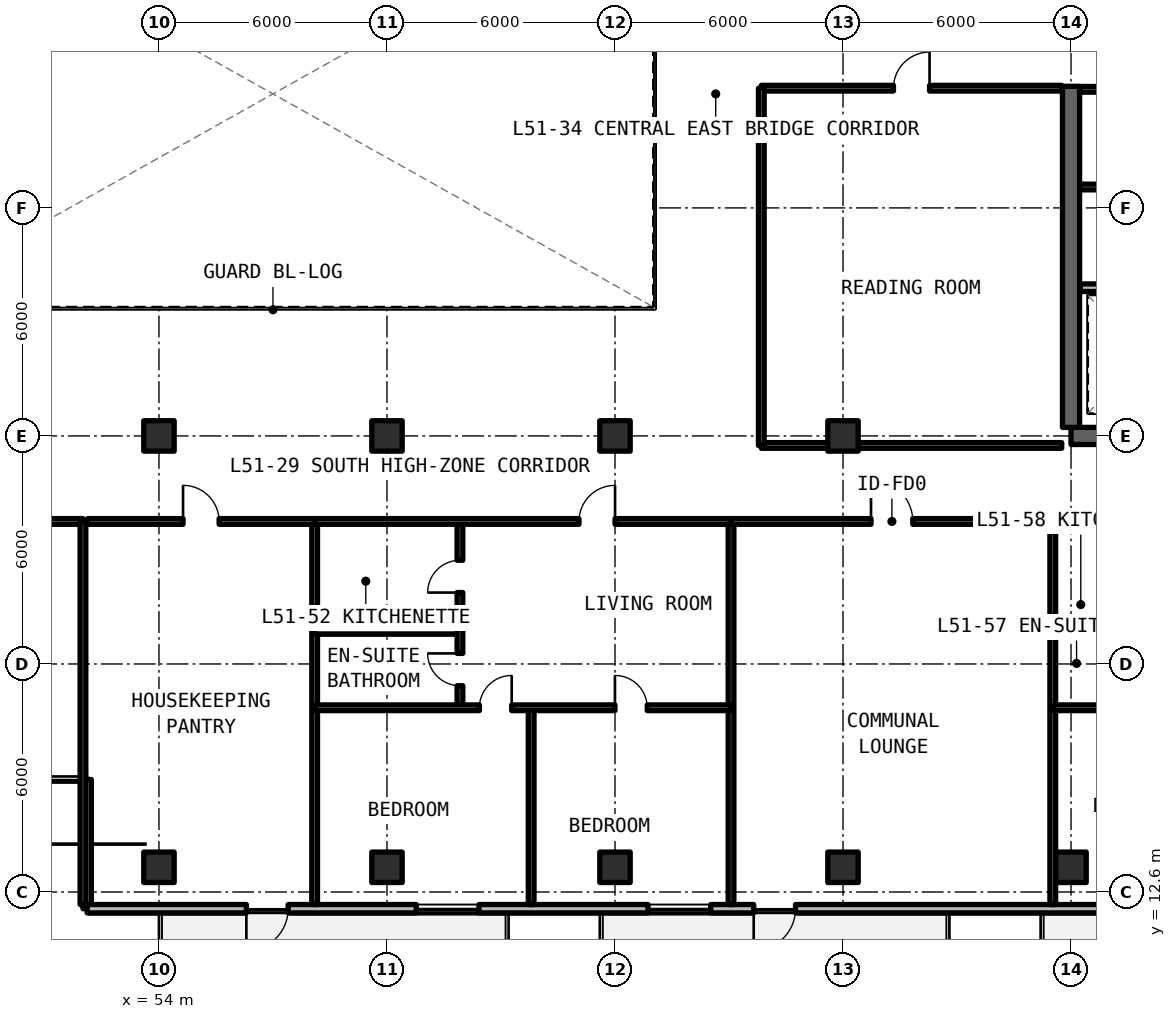
"""IFC4 building model, lengths in metres.
Left out: names, types, materials, properties, quantities, classifications, styles, units other than length and angle.
Written with IfcOpenShell. Run it as: python <this file> out.ifc"""

import sys

from ifc_helpers import new_model, si_unit, direction, frame, frame_2d, origin, origin_2d, place, context, subcontext, project, spatial, rectangle, extrude, element, fill, save


model = new_model("IFC4")
c1 = context("Model", 3, precision=1e-05, world=origin(), true_north=direction((0.0, 1.0)))
c2 = subcontext(c1, "Body", "Model", "MODEL_VIEW")
j1 = project(units=[si_unit("LENGTHUNIT", "METRE"), si_unit("PLANEANGLEUNIT", "RADIAN")], contexts=[c1])
p1 = place(None, origin())
s1 = spatial("IfcSite", under=j1, at=p1, CompositionType="ELEMENT")
p2 = place(p1, origin())
s2 = spatial("IfcBuilding", under=s1, at=p2, CompositionType="ELEMENT")
p3 = place(p2, frame((0.0, 0.0, 185.13)))
s3 = spatial("IfcBuildingStorey", under=s2, at=p3, CompositionType="ELEMENT", Elevation=185.13)
p4 = place(p3, frame((78.0, 24.6, 0.0), z_axis=(0.0, 0.0, 1.0), x_axis=(1.0, 0.0, 0.0)))
e1 = element("IfcWall", 1, at=p4, inside=s3, PredefinedType="SHEAR", context=c2, shape_type="SweptSolid", body=[
    extrude(rectangle(XDim=12.0, YDim=0.45, at=frame_2d((6.0, 0.0))), origin(), (0.0, 0.0, 1.0), 3.3),
])
p5 = place(p3, frame((78.0, 24.825, 0.0), z_axis=(0.0, 0.0, 1.0), x_axis=(0.0, 1.0, 0.0)))
e2 = element("IfcWall", 2, at=p5, inside=s3, PredefinedType="SHEAR", context=c2, shape_type="SweptSolid", body=[
    extrude(rectangle(XDim=8.975, YDim=0.45, at=frame_2d((4.488, 0.0))), origin(), (0.0, 0.0, 1.0), 3.3),
])
for number, where, z_axis, x_axis in (
    (3, (54.0, 24.6, 0.0), (0.0, 0.0, 1.0), (1.0, 0.0, 0.0)),
    (4, (60.0, 24.6, 0.0), (0.0, 0.0, 1.0), (1.0, 0.0, 0.0)),
    (5, (66.0, 24.6, 0.0), (0.0, 0.0, 1.0), (1.0, 0.0, 0.0)),
    (6, (72.0, 24.6, 0.0), (0.0, 0.0, 1.0), (1.0, 0.0, 0.0)),
    (7, (54.0, 13.25, 0.0), (0.0, 0.0, 1.0), (1.0, 0.0, 0.0)),
    (8, (60.0, 13.25, 0.0), (0.0, 0.0, 1.0), (1.0, 0.0, 0.0)),
    (9, (66.0, 13.25, 0.0), (0.0, 0.0, 1.0), (1.0, 0.0, 0.0)),
    (10, (72.0, 13.25, 0.0), (0.0, 0.0, 1.0), (1.0, 0.0, 0.0)),
    (11, (78.0, 13.25, 0.0), (0.0, 0.0, 1.0), (1.0, 0.0, 0.0)),
):
    element("IfcColumn", number, at=place(p3, frame(where, z_axis=z_axis, x_axis=x_axis)), inside=s3, PredefinedType="COLUMN", context=c2, shape_type="SweptSolid", body=[
        extrude(rectangle(XDim=0.8, YDim=0.8, at=origin_2d()), origin(), (0.0, 0.0, 1.0), 3.3),
    ])
p6 = place(p3, frame((52.11, 15.56, 0.0), z_axis=(0.0, 0.0, 1.0), x_axis=(0.0, -1.0, 0.0)))
e12 = element("IfcWall", 12, at=p6, inside=s3, PredefinedType="SOLIDWALL", context=c2, shape_type="SweptSolid", body=[
    extrude(rectangle(XDim=3.4, YDim=0.22, at=frame_2d((1.7, 0.0))), origin(), (0.0, 0.0, 1.0), 3.08),
])
p7 = place(p3, frame((52.11, 12.16, 0.0), z_axis=(0.0, 0.0, 1.0), x_axis=(1.0, 0.0, 0.0)))
e13 = element("IfcWall", 13, at=p7, inside=s3, PredefinedType="SOLIDWALL", context=c2, shape_type="SweptSolid", body=[
    extrude(rectangle(XDim=43.244, YDim=0.22, at=frame_2d((21.622, 0.0))), origin(), (0.0, 0.0, 1.0), 3.08),
])
p8 = place(p7, frame((4.19, 0.0, 0.0)))
e14 = element("IfcOpeningElement", 14, at=p8, cuts=e13, PredefinedType="OPENING", context=c2, shape_type="SweptSolid", body=[
    extrude(rectangle(XDim=1.1, YDim=2.15, at=frame_2d((0.55, 1.075))), frame((0.0, 0.12, 0.0), z_axis=(0.0, -1.0, 0.0), x_axis=(1.0, 0.0, 0.0)), (0.0, 0.0, 1.0), 0.24),
])
p9 = place(p7, frame((17.54, 0.0, 0.0)))
e15 = element("IfcOpeningElement", 15, at=p9, cuts=e13, PredefinedType="OPENING", context=c2, shape_type="SweptSolid", body=[
    extrude(rectangle(XDim=1.1, YDim=2.15, at=frame_2d((0.55, 1.075))), frame((0.0, 0.12, 0.0), z_axis=(0.0, -1.0, 0.0), x_axis=(1.0, 0.0, 0.0)), (0.0, 0.0, 1.0), 0.24),
])
p10 = place(p7, frame((28.89, 0.0, 0.0)))
e16 = element("IfcOpeningElement", 16, at=p10, cuts=e13, PredefinedType="OPENING", context=c2, shape_type="SweptSolid", body=[
    extrude(rectangle(XDim=1.1, YDim=2.15, at=frame_2d((0.55, 1.075))), frame((0.0, 0.12, 0.0), z_axis=(0.0, -1.0, 0.0), x_axis=(1.0, 0.0, 0.0)), (0.0, 0.0, 1.0), 0.24),
])
p11 = place(p7, frame((8.66, 0.0, 0.78)))
e17 = element("IfcOpeningElement", 17, at=p11, cuts=e13, PredefinedType="OPENING", context=c2, shape_type="SweptSolid", body=[
    extrude(rectangle(XDim=1.65, YDim=1.66, at=frame_2d((0.825, 0.83))), frame((0.0, 0.12, 0.0), z_axis=(0.0, -1.0, 0.0), x_axis=(1.0, 0.0, 0.0)), (0.0, 0.0, 1.0), 0.24),
])
p12 = place(p7, frame((14.759, 0.0, 0.78)))
e18 = element("IfcOpeningElement", 18, at=p12, cuts=e13, PredefinedType="OPENING", context=c2, shape_type="SweptSolid", body=[
    extrude(rectangle(XDim=1.65, YDim=1.66, at=frame_2d((0.825, 0.83))), frame((0.0, 0.12, 0.0), z_axis=(0.0, -1.0, 0.0), x_axis=(1.0, 0.0, 0.0)), (0.0, 0.0, 1.0), 0.24),
])
p13 = place(p7, frame((32.902, 0.0, 0.78)))
e19 = element("IfcOpeningElement", 19, at=p13, cuts=e13, PredefinedType="OPENING", context=c2, shape_type="SweptSolid", body=[
    extrude(rectangle(XDim=1.65, YDim=1.66, at=frame_2d((0.825, 0.83))), frame((0.0, 0.12, 0.0), z_axis=(0.0, -1.0, 0.0), x_axis=(1.0, 0.0, 0.0)), (0.0, 0.0, 1.0), 0.24),
])
p14 = place(p7, frame((38.313, 0.0, 0.78)))
e20 = element("IfcOpeningElement", 20, at=p14, cuts=e13, PredefinedType="OPENING", context=c2, shape_type="SweptSolid", body=[
    extrude(rectangle(XDim=0.85, YDim=1.65, at=frame_2d((0.425, 0.825))), frame((0.0, 0.12, 0.0), z_axis=(0.0, -1.0, 0.0), x_axis=(1.0, 0.0, 0.0)), (0.0, 0.0, 1.0), 0.24),
])
p15 = place(p7, frame((40.615, 0.0, 0.78)))
e21 = element("IfcOpeningElement", 21, at=p15, cuts=e13, PredefinedType="OPENING", context=c2, shape_type="SweptSolid", body=[
    extrude(rectangle(XDim=1.65, YDim=1.66, at=frame_2d((0.825, 0.83))), frame((0.0, 0.12, 0.0), z_axis=(0.0, -1.0, 0.0), x_axis=(1.0, 0.0, 0.0)), (0.0, 0.0, 1.0), 0.24),
])
p16 = place(p3, frame((78.245, 28.5, 0.0), z_axis=(0.0, 0.0, 1.0), x_axis=(1.0, 0.0, 0.0)))
e22 = element("IfcWall", 22, at=p16, inside=s3, PredefinedType="SOLIDWALL", context=c2, shape_type="SweptSolid", body=[
    extrude(rectangle(XDim=7.585, YDim=0.2, at=frame_2d((3.792, 0.0))), origin(), (0.0, 0.0, 1.0), 2.35),
])
p17 = place(p16, frame((3.555, 0.0, 0.0)))
e23 = element("IfcOpeningElement", 23, at=p17, cuts=e22, PredefinedType="OPENING", context=c2, shape_type="SweptSolid", body=[
    extrude(rectangle(XDim=1.0, YDim=2.15, at=frame_2d((0.5, 1.075))), frame((0.0, 0.11, 0.0), z_axis=(0.0, -1.0, 0.0), x_axis=(1.0, 0.0, 0.0)), (0.0, 0.0, 1.0), 0.22),
])
for number, where, z_axis, x_axis in (
    (24, (78.245, 31.15, 0.0), (0.0, 0.0, 1.0), (1.0, 0.0, 0.0)),
    (25, (78.245, 33.72, 0.0), (0.0, 0.0, 1.0), (1.0, 0.0, 0.0)),
):
    element("IfcWall", number, at=place(p3, frame(where, z_axis=z_axis, x_axis=x_axis)), inside=s3, PredefinedType="SOLIDWALL", context=c2, shape_type="SweptSolid", body=[
        extrude(rectangle(XDim=3.075, YDim=0.15, at=frame_2d((1.538, 0.0))), origin(), (0.0, 0.0, 1.0), 2.35),
    ])
p18 = place(p3, frame((69.85, 24.35, 0.0), z_axis=(0.0, 0.0, 1.0), x_axis=(1.0, 0.0, 0.0)))
e26 = element("IfcWall", 26, at=p18, inside=s3, PredefinedType="SOLIDWALL", context=c2, shape_type="SweptSolid", body=[
    extrude(rectangle(XDim=7.905, YDim=0.15, at=frame_2d((3.952, 0.0))), origin(), (0.0, 0.0, 1.0), 2.35),
])
p19 = place(p3, frame((69.85, 33.75, 0.0), z_axis=(0.0, 0.0, 1.0), x_axis=(1.0, 0.0, 0.0)))
e27 = element("IfcWall", 27, at=p19, inside=s3, PredefinedType="SOLIDWALL", context=c2, shape_type="SweptSolid", body=[
    extrude(rectangle(XDim=7.905, YDim=0.15, at=frame_2d((3.952, 0.0))), origin(), (0.0, 0.0, 1.0), 2.35),
])
p20 = place(p19, frame((3.478, 0.0, 0.0)))
e28 = element("IfcOpeningElement", 28, at=p20, cuts=e27, PredefinedType="OPENING", context=c2, shape_type="SweptSolid", body=[
    extrude(rectangle(XDim=0.95, YDim=2.15, at=frame_2d((0.475, 1.075))), frame((0.0, 0.085, 0.0), z_axis=(0.0, -1.0, 0.0), x_axis=(1.0, 0.0, 0.0)), (0.0, 0.0, 1.0), 0.17),
])
p21 = place(p3, frame((69.85, 24.35, 0.0), z_axis=(0.0, 0.0, 1.0), x_axis=(0.0, 1.0, 0.0)))
e29 = element("IfcWall", 29, at=p21, inside=s3, PredefinedType="SOLIDWALL", context=c2, shape_type="SweptSolid", body=[
    extrude(rectangle(XDim=9.4, YDim=0.15, at=frame_2d((4.7, 0.0))), origin(), (0.0, 0.0, 1.0), 2.35),
])
p22 = place(p3, frame((43.6, 22.35, 0.0), z_axis=(0.0, 0.0, 1.0), x_axis=(1.0, 0.0, 0.0)))
e30 = element("IfcWall", 30, at=p22, inside=s3, PredefinedType="SOLIDWALL", context=c2, shape_type="SweptSolid", body=[
    extrude(rectangle(XDim=8.4, YDim=0.15, at=frame_2d((4.2, 0.0))), origin(), (0.0, 0.0, 1.0), 2.35),
])
p23 = place(p22, frame((3.65, 0.0, 0.0)))
e31 = element("IfcOpeningElement", 31, at=p23, cuts=e30, PredefinedType="OPENING", context=c2, shape_type="SweptSolid", body=[
    extrude(rectangle(XDim=1.1, YDim=2.15, at=frame_2d((0.55, 1.075))), frame((0.0, 0.085, 0.0), z_axis=(0.0, -1.0, 0.0), x_axis=(1.0, 0.0, 0.0)), (0.0, 0.0, 1.0), 0.17),
])
for number, where, z_axis, x_axis in (
    (32, (52.0, 12.27, 0.0), (0.0, 0.0, 1.0), (0.0, 1.0, 0.0)),
    (33, (58.096, 12.27, 0.0), (0.0, 0.0, 1.0), (0.0, 1.0, 0.0)),
):
    element("IfcWall", number, at=place(p3, frame(where, z_axis=z_axis, x_axis=x_axis)), inside=s3, PredefinedType="SOLIDWALL", context=c2, shape_type="SweptSolid", body=[
        extrude(rectangle(XDim=10.08, YDim=0.15, at=frame_2d((5.04, 0.0))), origin(), (0.0, 0.0, 1.0), 2.35),
    ])
p24 = place(p3, frame((52.12, 22.35, 0.0), z_axis=(0.0, 0.0, 1.0), x_axis=(1.0, 0.0, 0.0)))
e34 = element("IfcWall", 34, at=p24, inside=s3, PredefinedType="SOLIDWALL", context=c2, shape_type="SweptSolid", body=[
    extrude(rectangle(XDim=5.976, YDim=0.15, at=frame_2d((2.988, 0.0))), origin(), (0.0, 0.0, 1.0), 2.35),
])
p25 = place(p24, frame((2.513, 0.0, 0.0)))
e35 = element("IfcOpeningElement", 35, at=p25, cuts=e34, PredefinedType="OPENING", context=c2, shape_type="SweptSolid", body=[
    extrude(rectangle(XDim=0.95, YDim=2.15, at=frame_2d((0.475, 1.075))), frame((0.0, 0.085, 0.0), z_axis=(0.0, -1.0, 0.0), x_axis=(1.0, 0.0, 0.0)), (0.0, 0.0, 1.0), 0.17),
])
p26 = place(p3, frame((69.053, 12.27, 0.0), z_axis=(0.0, 0.0, 1.0), x_axis=(0.0, 1.0, 0.0)))
e36 = element("IfcWall", 36, at=p26, inside=s3, PredefinedType="SOLIDWALL", context=c2, shape_type="SweptSolid", body=[
    extrude(rectangle(XDim=10.08, YDim=0.15, at=frame_2d((5.04, 0.0))), origin(), (0.0, 0.0, 1.0), 2.35),
])
p27 = place(p3, frame((58.096, 19.458, 0.0), z_axis=(0.0, 0.0, 1.0), x_axis=(1.0, 0.0, 0.0)))
e37 = element("IfcWall", 37, at=p27, inside=s3, PredefinedType="PARTITIONING", context=c2, shape_type="SweptSolid", body=[
    extrude(rectangle(XDim=3.823, YDim=0.15, at=frame_2d((1.912, 0.0))), origin(), (0.0, 0.0, 1.0), 2.35),
])
p28 = place(p3, frame((61.92, 17.448, 0.0), z_axis=(0.0, 0.0, 1.0), x_axis=(0.0, 1.0, 0.0)))
e38 = element("IfcWall", 38, at=p28, inside=s3, PredefinedType="PARTITIONING", context=c2, shape_type="SweptSolid", body=[
    extrude(rectangle(XDim=4.902, YDim=0.15, at=frame_2d((2.451, 0.0))), origin(), (0.0, 0.0, 1.0), 2.35),
])
p29 = place(p28, frame((0.58, 0.0, 0.0)))
e39 = element("IfcOpeningElement", 39, at=p29, cuts=e38, PredefinedType="OPENING", context=c2, shape_type="SweptSolid", body=[
    extrude(rectangle(XDim=0.85, YDim=2.1, at=frame_2d((0.425, 1.05))), frame((0.0, 0.085, 0.0), z_axis=(0.0, -1.0, 0.0), x_axis=(1.0, 0.0, 0.0)), (0.0, 0.0, 1.0), 0.17),
])
p30 = place(p28, frame((3.031, 0.0, 0.0)))
e40 = element("IfcOpeningElement", 40, at=p30, cuts=e38, PredefinedType="OPENING", context=c2, shape_type="SweptSolid", body=[
    extrude(rectangle(XDim=0.85, YDim=2.1, at=frame_2d((0.425, 1.05))), frame((0.0, 0.085, 0.0), z_axis=(0.0, -1.0, 0.0), x_axis=(1.0, 0.0, 0.0)), (0.0, 0.0, 1.0), 0.17),
])
p31 = place(p3, frame((63.794, 12.27, 0.0), z_axis=(0.0, 0.0, 1.0), x_axis=(0.0, 1.0, 0.0)))
e41 = element("IfcWall", 41, at=p31, inside=s3, PredefinedType="PARTITIONING", context=c2, shape_type="SweptSolid", body=[
    extrude(rectangle(XDim=5.178, YDim=0.15, at=frame_2d((2.589, 0.0))), origin(), (0.0, 0.0, 1.0), 2.35),
])
p32 = place(p3, frame((58.096, 17.448, 0.0), z_axis=(0.0, 0.0, 1.0), x_axis=(1.0, 0.0, 0.0)))
e42 = element("IfcWall", 42, at=p32, inside=s3, PredefinedType="PARTITIONING", context=c2, shape_type="SweptSolid", body=[
    extrude(rectangle(XDim=10.957, YDim=0.15, at=frame_2d((5.479, 0.0))), origin(), (0.0, 0.0, 1.0), 2.35),
])
p33 = place(p32, frame((4.335, 0.0, 0.0)))
e43 = element("IfcOpeningElement", 43, at=p33, cuts=e42, PredefinedType="OPENING", context=c2, shape_type="SweptSolid", body=[
    extrude(rectangle(XDim=0.85, YDim=2.1, at=frame_2d((0.425, 1.05))), frame((0.0, 0.085, 0.0), z_axis=(0.0, -1.0, 0.0), x_axis=(1.0, 0.0, 0.0)), (0.0, 0.0, 1.0), 0.17),
])
p34 = place(p32, frame((7.902, 0.0, 0.0)))
e44 = element("IfcOpeningElement", 44, at=p34, cuts=e42, PredefinedType="OPENING", context=c2, shape_type="SweptSolid", body=[
    extrude(rectangle(XDim=0.85, YDim=2.1, at=frame_2d((0.425, 1.05))), frame((0.0, 0.085, 0.0), z_axis=(0.0, -1.0, 0.0), x_axis=(1.0, 0.0, 0.0)), (0.0, 0.0, 1.0), 0.17),
])
p35 = place(p3, frame((58.096, 22.35, 0.0), z_axis=(0.0, 0.0, 1.0), x_axis=(1.0, 0.0, 0.0)))
e45 = element("IfcWall", 45, at=p35, inside=s3, PredefinedType="SOLIDWALL", context=c2, shape_type="SweptSolid", body=[
    extrude(rectangle(XDim=10.957, YDim=0.15, at=frame_2d((5.479, 0.0))), origin(), (0.0, 0.0, 1.0), 2.35),
])
p36 = place(p35, frame((6.955, 0.0, 0.0)))
e46 = element("IfcOpeningElement", 46, at=p36, cuts=e45, PredefinedType="OPENING", context=c2, shape_type="SweptSolid", body=[
    extrude(rectangle(XDim=0.95, YDim=2.15, at=frame_2d((0.475, 1.075))), frame((0.0, 0.085, 0.0), z_axis=(0.0, -1.0, 0.0), x_axis=(1.0, 0.0, 0.0)), (0.0, 0.0, 1.0), 0.17),
])
p37 = place(p3, frame((77.52, 12.27, 0.0), z_axis=(0.0, 0.0, 1.0), x_axis=(0.0, 1.0, 0.0)))
e47 = element("IfcWall", 47, at=p37, inside=s3, PredefinedType="SOLIDWALL", context=c2, shape_type="SweptSolid", body=[
    extrude(rectangle(XDim=10.08, YDim=0.15, at=frame_2d((5.04, 0.0))), origin(), (0.0, 0.0, 1.0), 2.35),
])
p38 = place(p3, frame((69.053, 22.35, 0.0), z_axis=(0.0, 0.0, 1.0), x_axis=(1.0, 0.0, 0.0)))
e48 = element("IfcWall", 48, at=p38, inside=s3, PredefinedType="SOLIDWALL", context=c2, shape_type="SweptSolid", body=[
    extrude(rectangle(XDim=8.467, YDim=0.15, at=frame_2d((4.233, 0.0))), origin(), (0.0, 0.0, 1.0), 2.35),
])
p39 = place(p38, frame((3.683, 0.0, 0.0)))
e49 = element("IfcOpeningElement", 49, at=p39, cuts=e48, PredefinedType="OPENING", context=c2, shape_type="SweptSolid", body=[
    extrude(rectangle(XDim=1.1, YDim=2.15, at=frame_2d((0.55, 1.075))), frame((0.0, 0.085, 0.0), z_axis=(0.0, -1.0, 0.0), x_axis=(1.0, 0.0, 0.0)), (0.0, 0.0, 1.0), 0.17),
])
p40 = place(p3, frame((77.52, 19.458, 0.0), z_axis=(0.0, 0.0, 1.0), x_axis=(1.0, 0.0, 0.0)))
e50 = element("IfcWall", 50, at=p40, inside=s3, PredefinedType="PARTITIONING", context=c2, shape_type="SweptSolid", body=[
    extrude(rectangle(XDim=2.4, YDim=0.15, at=frame_2d((1.2, 0.0))), origin(), (0.0, 0.0, 1.0), 2.35),
])
p41 = place(p3, frame((77.52, 17.448, 0.0), z_axis=(0.0, 0.0, 1.0), x_axis=(1.0, 0.0, 0.0)))
e51 = element("IfcWall", 51, at=p41, inside=s3, PredefinedType="PARTITIONING", context=c2, shape_type="SweptSolid", body=[
    extrude(rectangle(XDim=10.957, YDim=0.15, at=frame_2d((5.479, 0.0))), origin(), (0.0, 0.0, 1.0), 2.35),
])
p42 = place(p41, frame((3.624, 0.0, 0.0)))
e52 = element("IfcOpeningElement", 52, at=p42, cuts=e51, PredefinedType="OPENING", context=c2, shape_type="SweptSolid", body=[
    extrude(rectangle(XDim=0.85, YDim=2.1, at=frame_2d((0.425, 1.05))), frame((0.0, 0.085, 0.0), z_axis=(0.0, -1.0, 0.0), x_axis=(1.0, 0.0, 0.0)), (0.0, 0.0, 1.0), 0.17),
])
p43 = place(p41, frame((7.902, 0.0, 0.0)))
e53 = element("IfcOpeningElement", 53, at=p43, cuts=e51, PredefinedType="OPENING", context=c2, shape_type="SweptSolid", body=[
    extrude(rectangle(XDim=0.85, YDim=2.1, at=frame_2d((0.425, 1.05))), frame((0.0, 0.085, 0.0), z_axis=(0.0, -1.0, 0.0), x_axis=(1.0, 0.0, 0.0)), (0.0, 0.0, 1.0), 0.17),
])
p44 = place(p3, frame((77.52, 22.35, 0.0), z_axis=(0.0, 0.0, 1.0), x_axis=(1.0, 0.0, 0.0)))
e54 = element("IfcWall", 54, at=p44, inside=s3, PredefinedType="SOLIDWALL", context=c2, shape_type="SweptSolid", body=[
    extrude(rectangle(XDim=10.957, YDim=0.15, at=frame_2d((5.479, 0.0))), origin(), (0.0, 0.0, 1.0), 2.35),
])
p45 = place(p44, frame((6.243, 0.0, 0.0)))
e55 = element("IfcOpeningElement", 55, at=p45, cuts=e54, PredefinedType="OPENING", context=c2, shape_type="SweptSolid", body=[
    extrude(rectangle(XDim=0.95, YDim=2.15, at=frame_2d((0.475, 1.075))), frame((0.0, 0.085, 0.0), z_axis=(0.0, -1.0, 0.0), x_axis=(1.0, 0.0, 0.0)), (0.0, 0.0, 1.0), 0.17),
])
p46 = place(p8, frame((1.1, 0.0, 0.0), z_axis=(0.0, 0.0, 1.0), x_axis=(-1.0, 0.0, 0.0)))
e56 = element("IfcDoor", 56, at=p46, inside=s3, OperationType="SINGLE_SWING_RIGHT", PredefinedType="DOOR", context=c2, shape_type="SweptSolid", body=[
    extrude(rectangle(XDim=1.1, YDim=2.15, at=frame_2d((0.55, 1.075))), frame((0.0, 0.025, 0.0), z_axis=(0.0, -1.0, 0.0), x_axis=(1.0, 0.0, 0.0)), (0.0, 0.0, 1.0), 0.05),
])
fill(e14, e56)
p47 = place(p9, frame((1.1, 0.0, 0.0), z_axis=(0.0, 0.0, 1.0), x_axis=(-1.0, 0.0, 0.0)))
e57 = element("IfcDoor", 57, at=p47, inside=s3, OperationType="SINGLE_SWING_LEFT", PredefinedType="DOOR", context=c2, shape_type="SweptSolid", body=[
    extrude(rectangle(XDim=1.1, YDim=2.15, at=frame_2d((0.55, 1.075))), frame((0.0, 0.025, 0.0), z_axis=(0.0, -1.0, 0.0), x_axis=(1.0, 0.0, 0.0)), (0.0, 0.0, 1.0), 0.05),
])
fill(e15, e57)
p48 = place(p11, origin())
e58 = element("IfcWindow", 58, at=p48, inside=s3, PartitioningType="SINGLE_PANEL", PredefinedType="WINDOW", context=c2, shape_type="SweptSolid", body=[
    extrude(rectangle(XDim=1.65, YDim=1.66, at=frame_2d((0.825, 0.83))), frame((0.0, 0.03, 0.0), z_axis=(0.0, -1.0, 0.0), x_axis=(1.0, 0.0, 0.0)), (0.0, 0.0, 1.0), 0.06),
])
fill(e17, e58)
p49 = place(p12, origin())
e59 = element("IfcWindow", 59, at=p49, inside=s3, PartitioningType="SINGLE_PANEL", PredefinedType="WINDOW", context=c2, shape_type="SweptSolid", body=[
    extrude(rectangle(XDim=1.65, YDim=1.66, at=frame_2d((0.825, 0.83))), frame((0.0, 0.03, 0.0), z_axis=(0.0, -1.0, 0.0), x_axis=(1.0, 0.0, 0.0)), (0.0, 0.0, 1.0), 0.06),
])
fill(e18, e59)
p50 = place(p20, origin())
e60 = element("IfcDoor", 60, at=p50, inside=s3, OperationType="SINGLE_SWING_RIGHT", PredefinedType="DOOR", context=c2, shape_type="SweptSolid", body=[
    extrude(rectangle(XDim=0.95, YDim=2.15, at=frame_2d((0.475, 1.075))), frame((0.0, 0.025, 0.0), z_axis=(0.0, -1.0, 0.0), x_axis=(1.0, 0.0, 0.0)), (0.0, 0.0, 1.0), 0.05),
])
fill(e28, e60)
p51 = place(p25, origin())
e61 = element("IfcDoor", 61, at=p51, inside=s3, OperationType="SINGLE_SWING_LEFT", PredefinedType="DOOR", context=c2, shape_type="SweptSolid", body=[
    extrude(rectangle(XDim=0.95, YDim=2.15, at=frame_2d((0.475, 1.075))), frame((0.0, 0.025, 0.0), z_axis=(0.0, -1.0, 0.0), x_axis=(1.0, 0.0, 0.0)), (0.0, 0.0, 1.0), 0.05),
])
fill(e35, e61)
p52 = place(p29, origin())
e62 = element("IfcDoor", 62, at=p52, inside=s3, OperationType="SINGLE_SWING_RIGHT", PredefinedType="DOOR", context=c2, shape_type="SweptSolid", body=[
    extrude(rectangle(XDim=0.85, YDim=2.1, at=frame_2d((0.425, 1.05))), frame((0.0, 0.025, 0.0), z_axis=(0.0, -1.0, 0.0), x_axis=(1.0, 0.0, 0.0)), (0.0, 0.0, 1.0), 0.05),
])
fill(e39, e62)
p53 = place(p30, origin())
e63 = element("IfcDoor", 63, at=p53, inside=s3, OperationType="SINGLE_SWING_LEFT", PredefinedType="DOOR", context=c2, shape_type="SweptSolid", body=[
    extrude(rectangle(XDim=0.85, YDim=2.1, at=frame_2d((0.425, 1.05))), frame((0.0, 0.025, 0.0), z_axis=(0.0, -1.0, 0.0), x_axis=(1.0, 0.0, 0.0)), (0.0, 0.0, 1.0), 0.05),
])
fill(e40, e63)
p54 = place(p33, origin())
e64 = element("IfcDoor", 64, at=p54, inside=s3, OperationType="SINGLE_SWING_RIGHT", PredefinedType="DOOR", context=c2, shape_type="SweptSolid", body=[
    extrude(rectangle(XDim=0.85, YDim=2.1, at=frame_2d((0.425, 1.05))), frame((0.0, 0.025, 0.0), z_axis=(0.0, -1.0, 0.0), x_axis=(1.0, 0.0, 0.0)), (0.0, 0.0, 1.0), 0.05),
])
fill(e43, e64)
p55 = place(p34, origin())
e65 = element("IfcDoor", 65, at=p55, inside=s3, OperationType="SINGLE_SWING_LEFT", PredefinedType="DOOR", context=c2, shape_type="SweptSolid", body=[
    extrude(rectangle(XDim=0.85, YDim=2.1, at=frame_2d((0.425, 1.05))), frame((0.0, 0.025, 0.0), z_axis=(0.0, -1.0, 0.0), x_axis=(1.0, 0.0, 0.0)), (0.0, 0.0, 1.0), 0.05),
])
fill(e44, e65)
p56 = place(p36, origin())
e66 = element("IfcDoor", 66, at=p56, inside=s3, OperationType="SINGLE_SWING_RIGHT", PredefinedType="DOOR", context=c2, shape_type="SweptSolid", body=[
    extrude(rectangle(XDim=0.95, YDim=2.15, at=frame_2d((0.475, 1.075))), frame((0.0, 0.025, 0.0), z_axis=(0.0, -1.0, 0.0), x_axis=(1.0, 0.0, 0.0)), (0.0, 0.0, 1.0), 0.05),
])
fill(e46, e66)
p57 = place(p39, origin())
e67 = element("IfcDoor", 67, at=p57, inside=s3, OperationType="SINGLE_SWING_LEFT", PredefinedType="DOOR", context=c2, shape_type="SweptSolid", body=[
    extrude(rectangle(XDim=1.1, YDim=2.15, at=frame_2d((0.55, 1.075))), frame((0.0, 0.025, 0.0), z_axis=(0.0, -1.0, 0.0), x_axis=(1.0, 0.0, 0.0)), (0.0, 0.0, 1.0), 0.05),
])
fill(e49, e67)
save(model, sys.argv[1])
